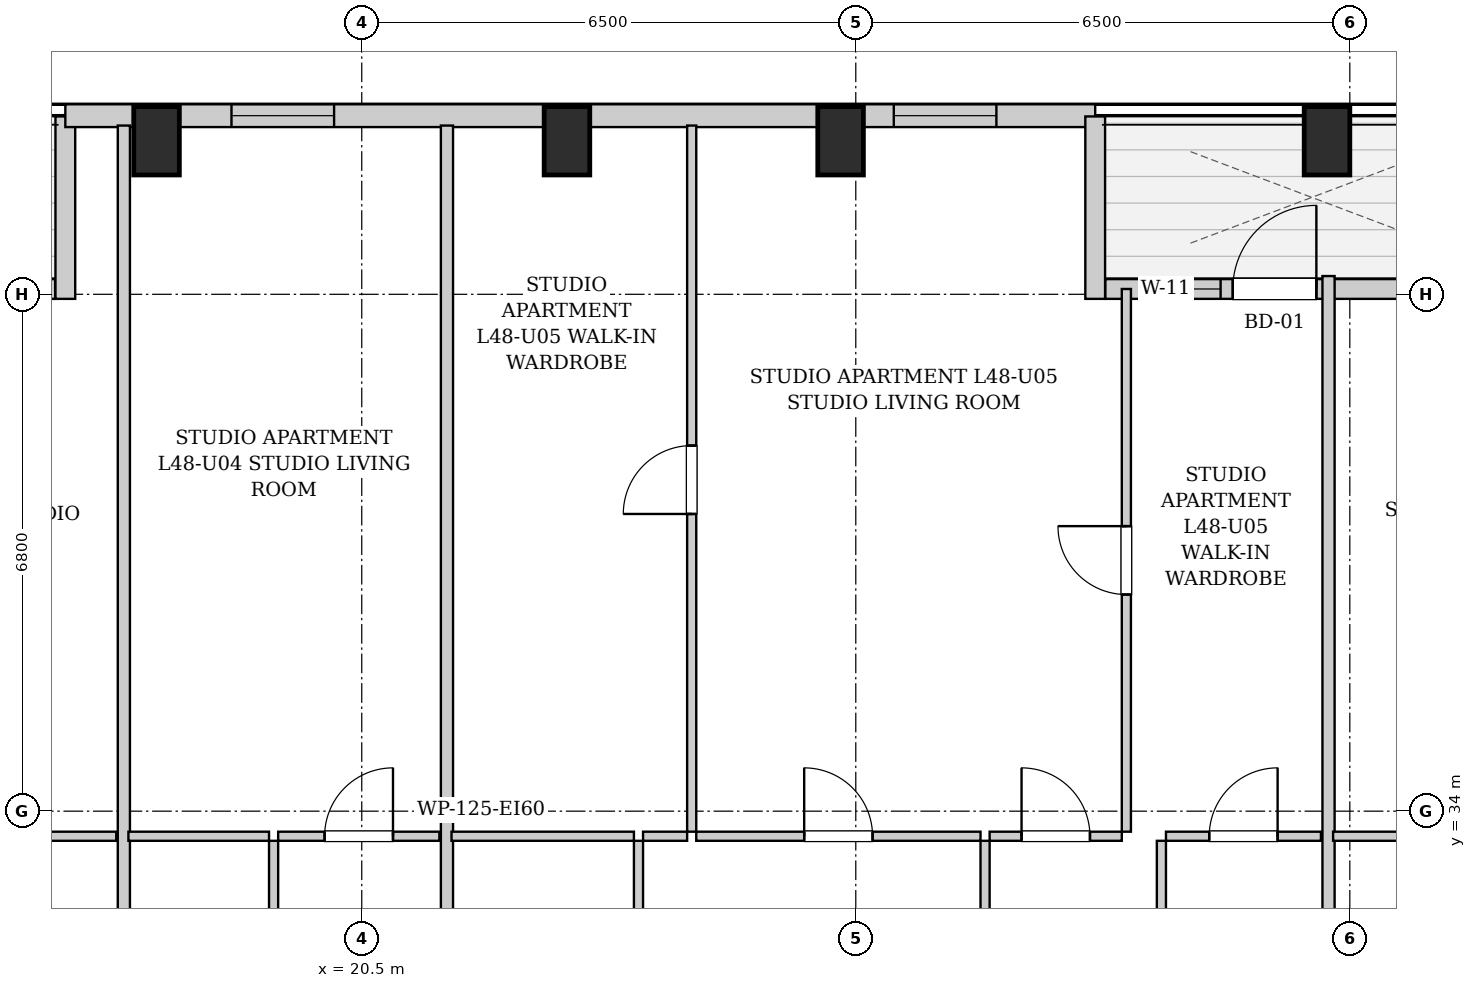
"""IFC4 building model, lengths in metres.
Left out: names, types, materials, properties, quantities, classifications, styles, units other than length and angle.
Written with IfcOpenShell. Run it as: python <this file> out.ifc"""

import sys

from ifc_helpers import new_model, si_unit, direction, frame, frame_2d, origin, origin_2d, place, context, subcontext, project, spatial, rectangle, extrude, element, fill, save


model = new_model("IFC4")
c1 = context("Model", 3, precision=1e-05, world=origin(), true_north=direction((0.0, 1.0)))
c2 = subcontext(c1, "Body", "Model", "MODEL_VIEW")
j1 = project(units=[si_unit("LENGTHUNIT", "METRE"), si_unit("PLANEANGLEUNIT", "RADIAN")], contexts=[c1])
p1 = place(None, origin())
s1 = spatial("IfcSite", under=j1, at=p1, CompositionType="ELEMENT")
p2 = place(p1, origin())
s2 = spatial("IfcBuilding", under=s1, at=p2, CompositionType="ELEMENT")
p3 = place(p2, frame((0.0, 0.0, 166.65)))
s3 = spatial("IfcBuildingStorey", under=s2, at=p3, CompositionType="ELEMENT", Elevation=166.65)
for number, where, z_axis, x_axis in (
    (1, (17.8, 42.82, 0.0), (0.0, 0.0, 1.0), (1.0, 0.0, 0.0)),
    (2, (23.2, 42.82, 0.0), (0.0, 0.0, 1.0), (1.0, 0.0, 0.0)),
    (3, (26.8, 42.82, 0.0), (0.0, 0.0, 1.0), (1.0, 0.0, 0.0)),
    (4, (33.2, 42.82, 0.0), (0.0, 0.0, 1.0), (1.0, 0.0, 0.0)),
):
    element("IfcColumn", number, at=place(p3, frame(where, z_axis=z_axis, x_axis=x_axis)), inside=s3, PredefinedType="COLUMN", context=c2, shape_type="SweptSolid", body=[
        extrude(rectangle(XDim=0.6, YDim=0.9, at=origin_2d()), origin(), (0.0, 0.0, 1.0), 3.25),
    ])
p4 = place(p3, frame((11.434, 40.87, 0.0), z_axis=(0.0, 0.0, 1.0), x_axis=(1.0, 0.0, 0.0)))
e5 = element("IfcWall", 5, at=p4, inside=s3, PredefinedType="SOLIDWALL", context=c2, shape_type="SweptSolid", body=[
    extrude(rectangle(XDim=5.032, YDim=0.26, at=frame_2d((2.516, 0.0))), origin(), (0.0, 0.0, 1.0), 2.93),
])
p5 = place(p4, frame((1.966, 0.0, 0.0)))
e6 = element("IfcOpeningElement", 6, at=p5, cuts=e5, PredefinedType="OPENING", context=c2, shape_type="SweptSolid", body=[
    extrude(rectangle(XDim=1.1, YDim=2.0, at=frame_2d((0.55, 1.0))), frame((0.0, 0.14, 0.0), z_axis=(0.0, -1.0, 0.0), x_axis=(1.0, 0.0, 0.0)), (0.0, 0.0, 1.0), 0.28),
])
p6 = place(p4, frame((3.326, 0.0, 0.85)))
e7 = element("IfcOpeningElement", 7, at=p6, cuts=e5, PredefinedType="OPENING", context=c2, shape_type="SweptSolid", body=[
    extrude(rectangle(XDim=1.35, YDim=1.65, at=frame_2d((0.675, 0.825))), frame((0.0, 0.14, 0.0), z_axis=(0.0, -1.0, 0.0), x_axis=(1.0, 0.0, 0.0)), (0.0, 0.0, 1.0), 0.28),
])
p7 = place(p3, frame((16.6, 40.74, 0.0), z_axis=(0.0, 0.0, 1.0), x_axis=(0.0, 1.0, 0.0)))
e8 = element("IfcWall", 8, at=p7, inside=s3, PredefinedType="SOLIDWALL", context=c2, shape_type="SweptSolid", body=[
    extrude(rectangle(XDim=2.4, YDim=0.26, at=frame_2d((1.2, 0.0))), origin(), (0.0, 0.0, 1.0), 2.93),
])
p8 = place(p3, frame((16.6, 43.15, 0.0), z_axis=(0.0, 0.0, 1.0), x_axis=(1.0, 0.0, 0.0)))
e9 = element("IfcWall", 9, at=p8, inside=s3, PredefinedType="SOLIDWALL", context=c2, shape_type="SweptSolid", body=[
    extrude(rectangle(XDim=13.55, YDim=0.3, at=frame_2d((6.775, 0.0))), origin(), (0.0, 0.0, 1.0), 2.93),
])
p9 = place(p8, frame((2.186, 0.0, 0.55)))
e10 = element("IfcOpeningElement", 10, at=p9, cuts=e9, PredefinedType="OPENING", context=c2, shape_type="SweptSolid", body=[
    extrude(rectangle(XDim=1.35, YDim=1.2, at=frame_2d((0.675, 0.6))), frame((0.0, 0.16, 0.0), z_axis=(0.0, -1.0, 0.0), x_axis=(1.0, 0.0, 0.0)), (0.0, 0.0, 1.0), 0.32),
])
p10 = place(p8, frame((10.9, 0.0, 0.55)))
e11 = element("IfcOpeningElement", 11, at=p10, cuts=e9, PredefinedType="OPENING", context=c2, shape_type="SweptSolid", body=[
    extrude(rectangle(XDim=1.35, YDim=1.2, at=frame_2d((0.675, 0.6))), frame((0.0, 0.16, 0.0), z_axis=(0.0, -1.0, 0.0), x_axis=(1.0, 0.0, 0.0)), (0.0, 0.0, 1.0), 0.32),
])
p11 = place(p3, frame((30.15, 43.14, 0.0), z_axis=(0.0, 0.0, 1.0), x_axis=(0.0, -1.0, 0.0)))
e12 = element("IfcWall", 12, at=p11, inside=s3, PredefinedType="SOLIDWALL", context=c2, shape_type="SweptSolid", body=[
    extrude(rectangle(XDim=2.4, YDim=0.26, at=frame_2d((1.2, 0.0))), origin(), (0.0, 0.0, 1.0), 2.93),
])
p12 = place(p3, frame((30.284, 40.87, 0.0), z_axis=(0.0, 0.0, 1.0), x_axis=(1.0, 0.0, 0.0)))
e13 = element("IfcWall", 13, at=p12, inside=s3, PredefinedType="SOLIDWALL", context=c2, shape_type="SweptSolid", body=[
    extrude(rectangle(XDim=5.432, YDim=0.26, at=frame_2d((2.716, 0.0))), origin(), (0.0, 0.0, 1.0), 2.93),
])
p13 = place(p12, frame((1.676, 0.0, 0.0)))
e14 = element("IfcOpeningElement", 14, at=p13, cuts=e13, PredefinedType="OPENING", context=c2, shape_type="SweptSolid", body=[
    extrude(rectangle(XDim=1.1, YDim=2.0, at=frame_2d((0.55, 1.0))), frame((0.0, 0.14, 0.0), z_axis=(0.0, -1.0, 0.0), x_axis=(1.0, 0.0, 0.0)), (0.0, 0.0, 1.0), 0.28),
])
p14 = place(p12, frame((0.666, 0.0, 0.55)))
e15 = element("IfcOpeningElement", 15, at=p14, cuts=e13, PredefinedType="OPENING", context=c2, shape_type="SweptSolid", body=[
    extrude(rectangle(XDim=0.85, YDim=1.2, at=frame_2d((0.425, 0.6))), frame((0.0, 0.14, 0.0), z_axis=(0.0, -1.0, 0.0), x_axis=(1.0, 0.0, 0.0)), (0.0, 0.0, 1.0), 0.28),
])
p15 = place(p3, frame((12.357, 33.67, 0.0), z_axis=(0.0, 0.0, 1.0), x_axis=(1.0, 0.0, 0.0)))
e16 = element("IfcWall", 16, at=p15, inside=s3, PredefinedType="PARTITIONING", context=c2, shape_type="SweptSolid", body=[
    extrude(rectangle(XDim=4.913, YDim=0.12, at=frame_2d((2.457, 0.0))), origin(), (0.0, 0.0, 1.0), 2.93),
])
p16 = place(p15, frame((2.006, 0.0, 0.0)))
e17 = element("IfcOpeningElement", 17, at=p16, cuts=e16, PredefinedType="OPENING", context=c2, shape_type="SweptSolid", body=[
    extrude(rectangle(XDim=0.9, YDim=2.05, at=frame_2d((0.45, 1.025))), frame((0.0, 0.07, 0.0), z_axis=(0.0, -1.0, 0.0), x_axis=(1.0, 0.0, 0.0)), (0.0, 0.0, 1.0), 0.14),
])
p17 = place(p3, frame((17.37, 30.76, 0.0), z_axis=(0.0, 0.0, 1.0), x_axis=(0.0, 1.0, 0.0)))
e18 = element("IfcWall", 18, at=p17, inside=s3, PredefinedType="PARTITIONING", context=c2, shape_type="SweptSolid", body=[
    extrude(rectangle(XDim=12.26, YDim=0.16, at=frame_2d((6.13, 0.0))), origin(), (0.0, 0.0, 1.0), 2.93),
])
p18 = place(p3, frame((19.34, 30.76, 0.0), z_axis=(0.0, 0.0, 1.0), x_axis=(0.0, 1.0, 0.0)))
e19 = element("IfcWall", 19, at=p18, inside=s3, PredefinedType="PARTITIONING", context=c2, shape_type="SweptSolid", body=[
    extrude(rectangle(XDim=2.85, YDim=0.12, at=frame_2d((1.425, 0.0))), origin(), (0.0, 0.0, 1.0), 2.93),
])
p19 = place(p18, frame((0.995, 0.0, 0.0)))
e20 = element("IfcOpeningElement", 20, at=p19, cuts=e19, PredefinedType="OPENING", context=c2, shape_type="SweptSolid", body=[
    extrude(rectangle(XDim=0.86, YDim=2.05, at=frame_2d((0.43, 1.025))), frame((0.0, 0.07, 0.0), z_axis=(0.0, -1.0, 0.0), x_axis=(1.0, 0.0, 0.0)), (0.0, 0.0, 1.0), 0.14),
])
p20 = place(p3, frame((17.43, 33.67, 0.0), z_axis=(0.0, 0.0, 1.0), x_axis=(1.0, 0.0, 0.0)))
e21 = element("IfcWall", 21, at=p20, inside=s3, PredefinedType="PARTITIONING", context=c2, shape_type="SweptSolid", body=[
    extrude(rectangle(XDim=1.85, YDim=0.12, at=frame_2d((0.925, 0.0))), origin(), (0.0, 0.0, 1.0), 2.93),
])
p21 = place(p3, frame((19.4, 33.67, 0.0), z_axis=(0.0, 0.0, 1.0), x_axis=(1.0, 0.0, 0.0)))
e22 = element("IfcWall", 22, at=p21, inside=s3, PredefinedType="PARTITIONING", context=c2, shape_type="SweptSolid", body=[
    extrude(rectangle(XDim=2.121, YDim=0.12, at=frame_2d((1.061, 0.0))), origin(), (0.0, 0.0, 1.0), 2.93),
])
p22 = place(p21, frame((0.611, 0.0, 0.0)))
e23 = element("IfcOpeningElement", 23, at=p22, cuts=e22, PredefinedType="OPENING", context=c2, shape_type="SweptSolid", body=[
    extrude(rectangle(XDim=0.9, YDim=2.05, at=frame_2d((0.45, 1.025))), frame((0.0, 0.07, 0.0), z_axis=(0.0, -1.0, 0.0), x_axis=(1.0, 0.0, 0.0)), (0.0, 0.0, 1.0), 0.14),
])
p23 = place(p3, frame((21.621, 30.76, 0.0), z_axis=(0.0, 0.0, 1.0), x_axis=(0.0, 1.0, 0.0)))
e24 = element("IfcWall", 24, at=p23, inside=s3, PredefinedType="PARTITIONING", context=c2, shape_type="SweptSolid", body=[
    extrude(rectangle(XDim=12.26, YDim=0.16, at=frame_2d((6.13, 0.0))), origin(), (0.0, 0.0, 1.0), 2.93),
])
p24 = place(p3, frame((24.141, 30.76, 0.0), z_axis=(0.0, 0.0, 1.0), x_axis=(0.0, 1.0, 0.0)))
e25 = element("IfcWall", 25, at=p24, inside=s3, PredefinedType="PARTITIONING", context=c2, shape_type="SweptSolid", body=[
    extrude(rectangle(XDim=2.85, YDim=0.12, at=frame_2d((1.425, 0.0))), origin(), (0.0, 0.0, 1.0), 2.93),
])
p25 = place(p24, frame((0.995, 0.0, 0.0)))
e26 = element("IfcOpeningElement", 26, at=p25, cuts=e25, PredefinedType="OPENING", context=c2, shape_type="SweptSolid", body=[
    extrude(rectangle(XDim=0.86, YDim=2.05, at=frame_2d((0.43, 1.025))), frame((0.0, 0.07, 0.0), z_axis=(0.0, -1.0, 0.0), x_axis=(1.0, 0.0, 0.0)), (0.0, 0.0, 1.0), 0.14),
])
p26 = place(p3, frame((21.681, 33.67, 0.0), z_axis=(0.0, 0.0, 1.0), x_axis=(1.0, 0.0, 0.0)))
e27 = element("IfcWall", 27, at=p26, inside=s3, PredefinedType="PARTITIONING", context=c2, shape_type="SweptSolid", body=[
    extrude(rectangle(XDim=2.4, YDim=0.12, at=frame_2d((1.2, 0.0))), origin(), (0.0, 0.0, 1.0), 2.93),
])
p27 = place(p3, frame((28.701, 30.76, 0.0), z_axis=(0.0, 0.0, 1.0), x_axis=(0.0, 1.0, 0.0)))
e28 = element("IfcWall", 28, at=p27, inside=s3, PredefinedType="PARTITIONING", context=c2, shape_type="SweptSolid", body=[
    extrude(rectangle(XDim=2.85, YDim=0.12, at=frame_2d((1.425, 0.0))), origin(), (0.0, 0.0, 1.0), 2.93),
])
p28 = place(p27, frame((0.975, 0.0, 0.0)))
e29 = element("IfcOpeningElement", 29, at=p28, cuts=e28, PredefinedType="OPENING", context=c2, shape_type="SweptSolid", body=[
    extrude(rectangle(XDim=0.9, YDim=2.05, at=frame_2d((0.45, 1.025))), frame((0.0, 0.07, 0.0), z_axis=(0.0, -1.0, 0.0), x_axis=(1.0, 0.0, 0.0)), (0.0, 0.0, 1.0), 0.14),
])
p29 = place(p3, frame((24.201, 33.67, 0.0), z_axis=(0.0, 0.0, 1.0), x_axis=(1.0, 0.0, 0.0)))
e30 = element("IfcWall", 30, at=p29, inside=s3, PredefinedType="PARTITIONING", context=c2, shape_type="SweptSolid", body=[
    extrude(rectangle(XDim=0.58, YDim=0.12, at=frame_2d((0.29, 0.0))), origin(), (0.0, 0.0, 1.0), 2.93),
])
p30 = place(p3, frame((24.901, 33.67, 0.0), z_axis=(0.0, 0.0, 1.0), x_axis=(1.0, 0.0, 0.0)))
e31 = element("IfcWall", 31, at=p30, inside=s3, PredefinedType="PARTITIONING", context=c2, shape_type="SweptSolid", body=[
    extrude(rectangle(XDim=3.74, YDim=0.12, at=frame_2d((1.87, 0.0))), origin(), (0.0, 0.0, 1.0), 2.93),
])
p31 = place(p30, frame((1.42, 0.0, 0.0)))
e32 = element("IfcOpeningElement", 32, at=p31, cuts=e31, PredefinedType="OPENING", context=c2, shape_type="SweptSolid", body=[
    extrude(rectangle(XDim=0.9, YDim=2.05, at=frame_2d((0.45, 1.025))), frame((0.0, 0.07, 0.0), z_axis=(0.0, -1.0, 0.0), x_axis=(1.0, 0.0, 0.0)), (0.0, 0.0, 1.0), 0.14),
])
p32 = place(p3, frame((31.021, 30.76, 0.0), z_axis=(0.0, 0.0, 1.0), x_axis=(0.0, 1.0, 0.0)))
e33 = element("IfcWall", 33, at=p32, inside=s3, PredefinedType="PARTITIONING", context=c2, shape_type="SweptSolid", body=[
    extrude(rectangle(XDim=2.85, YDim=0.12, at=frame_2d((1.425, 0.0))), origin(), (0.0, 0.0, 1.0), 2.93),
])
p33 = place(p32, frame((0.975, 0.0, 0.0)))
e34 = element("IfcOpeningElement", 34, at=p33, cuts=e33, PredefinedType="OPENING", context=c2, shape_type="SweptSolid", body=[
    extrude(rectangle(XDim=0.9, YDim=2.05, at=frame_2d((0.45, 1.025))), frame((0.0, 0.07, 0.0), z_axis=(0.0, -1.0, 0.0), x_axis=(1.0, 0.0, 0.0)), (0.0, 0.0, 1.0), 0.14),
])
p34 = place(p3, frame((28.761, 33.67, 0.0), z_axis=(0.0, 0.0, 1.0), x_axis=(1.0, 0.0, 0.0)))
e35 = element("IfcWall", 35, at=p34, inside=s3, PredefinedType="PARTITIONING", context=c2, shape_type="SweptSolid", body=[
    extrude(rectangle(XDim=1.739, YDim=0.12, at=frame_2d((0.87, 0.0))), origin(), (0.0, 0.0, 1.0), 2.93),
])
p35 = place(p34, frame((0.42, 0.0, 0.0)))
e36 = element("IfcOpeningElement", 36, at=p35, cuts=e35, PredefinedType="OPENING", context=c2, shape_type="SweptSolid", body=[
    extrude(rectangle(XDim=0.9, YDim=2.05, at=frame_2d((0.45, 1.025))), frame((0.0, 0.07, 0.0), z_axis=(0.0, -1.0, 0.0), x_axis=(1.0, 0.0, 0.0)), (0.0, 0.0, 1.0), 0.14),
])
p36 = place(p3, frame((31.081, 33.67, 0.0), z_axis=(0.0, 0.0, 1.0), x_axis=(1.0, 0.0, 0.0)))
e37 = element("IfcWall", 37, at=p36, inside=s3, PredefinedType="PARTITIONING", context=c2, shape_type="SweptSolid", body=[
    extrude(rectangle(XDim=2.039, YDim=0.12, at=frame_2d((1.02, 0.0))), origin(), (0.0, 0.0, 1.0), 2.93),
])
p37 = place(p36, frame((0.569, 0.0, 0.0)))
e38 = element("IfcOpeningElement", 38, at=p37, cuts=e37, PredefinedType="OPENING", context=c2, shape_type="SweptSolid", body=[
    extrude(rectangle(XDim=0.9, YDim=2.05, at=frame_2d((0.45, 1.025))), frame((0.0, 0.07, 0.0), z_axis=(0.0, -1.0, 0.0), x_axis=(1.0, 0.0, 0.0)), (0.0, 0.0, 1.0), 0.14),
])
p38 = place(p3, frame((24.841, 33.73, 0.0), z_axis=(0.0, 0.0, 1.0), x_axis=(0.0, 1.0, 0.0)))
e39 = element("IfcWall", 39, at=p38, inside=s3, PredefinedType="PARTITIONING", context=c2, shape_type="SweptSolid", body=[
    extrude(rectangle(XDim=9.29, YDim=0.12, at=frame_2d((4.645, 0.0))), origin(), (0.0, 0.0, 1.0), 2.93),
])
p39 = place(p38, frame((4.18, 0.0, 0.0)))
e40 = element("IfcOpeningElement", 40, at=p39, cuts=e39, PredefinedType="OPENING", context=c2, shape_type="SweptSolid", body=[
    extrude(rectangle(XDim=0.9, YDim=2.05, at=frame_2d((0.45, 1.025))), frame((0.0, 0.07, 0.0), z_axis=(0.0, -1.0, 0.0), x_axis=(1.0, 0.0, 0.0)), (0.0, 0.0, 1.0), 0.14),
])
p40 = place(p3, frame((30.56, 33.73, 0.0), z_axis=(0.0, 0.0, 1.0), x_axis=(0.0, 1.0, 0.0)))
e41 = element("IfcWall", 41, at=p40, inside=s3, PredefinedType="PARTITIONING", context=c2, shape_type="SweptSolid", body=[
    extrude(rectangle(XDim=7.14, YDim=0.12, at=frame_2d((3.57, 0.0))), origin(), (0.0, 0.0, 1.0), 2.93),
])
p41 = place(p40, frame((3.12, 0.0, 0.0)))
e42 = element("IfcOpeningElement", 42, at=p41, cuts=e41, PredefinedType="OPENING", context=c2, shape_type="SweptSolid", body=[
    extrude(rectangle(XDim=0.9, YDim=2.05, at=frame_2d((0.45, 1.025))), frame((0.0, 0.07, 0.0), z_axis=(0.0, -1.0, 0.0), x_axis=(1.0, 0.0, 0.0)), (0.0, 0.0, 1.0), 0.14),
])
p42 = place(p3, frame((33.22, 30.76, 0.0), z_axis=(0.0, 0.0, 1.0), x_axis=(0.0, 1.0, 0.0)))
e43 = element("IfcWall", 43, at=p42, inside=s3, PredefinedType="PARTITIONING", context=c2, shape_type="SweptSolid", body=[
    extrude(rectangle(XDim=10.28, YDim=0.16, at=frame_2d((5.14, 0.0))), origin(), (0.0, 0.0, 1.0), 2.382),
])
p43 = place(p3, frame((33.28, 33.67, 0.0), z_axis=(0.0, 0.0, 1.0), x_axis=(1.0, 0.0, 0.0)))
e44 = element("IfcWall", 44, at=p43, inside=s3, PredefinedType="PARTITIONING", context=c2, shape_type="SweptSolid", body=[
    extrude(rectangle(XDim=1.85, YDim=0.12, at=frame_2d((0.925, 0.0))), origin(), (0.0, 0.0, 1.0), 2.93),
])
p44 = place(p22, origin())
e45 = element("IfcDoor", 45, at=p44, inside=s3, OperationType="SINGLE_SWING_RIGHT", PredefinedType="DOOR", context=c2, shape_type="SweptSolid", body=[
    extrude(rectangle(XDim=0.9, YDim=2.05, at=frame_2d((0.45, 1.025))), frame((0.0, 0.025, 0.0), z_axis=(0.0, -1.0, 0.0), x_axis=(1.0, 0.0, 0.0)), (0.0, 0.0, 1.0), 0.05),
])
fill(e23, e45)
p45 = place(p31, origin())
e46 = element("IfcDoor", 46, at=p45, inside=s3, OperationType="SINGLE_SWING_LEFT", PredefinedType="DOOR", context=c2, shape_type="SweptSolid", body=[
    extrude(rectangle(XDim=0.9, YDim=2.05, at=frame_2d((0.45, 1.025))), frame((0.0, 0.025, 0.0), z_axis=(0.0, -1.0, 0.0), x_axis=(1.0, 0.0, 0.0)), (0.0, 0.0, 1.0), 0.05),
])
fill(e32, e46)
p46 = place(p35, origin())
e47 = element("IfcDoor", 47, at=p46, inside=s3, OperationType="SINGLE_SWING_LEFT", PredefinedType="DOOR", context=c2, shape_type="SweptSolid", body=[
    extrude(rectangle(XDim=0.9, YDim=2.05, at=frame_2d((0.45, 1.025))), frame((0.0, 0.025, 0.0), z_axis=(0.0, -1.0, 0.0), x_axis=(1.0, 0.0, 0.0)), (0.0, 0.0, 1.0), 0.05),
])
fill(e36, e47)
p47 = place(p37, origin())
e48 = element("IfcDoor", 48, at=p47, inside=s3, OperationType="SINGLE_SWING_RIGHT", PredefinedType="DOOR", context=c2, shape_type="SweptSolid", body=[
    extrude(rectangle(XDim=0.9, YDim=2.05, at=frame_2d((0.45, 1.025))), frame((0.0, 0.025, 0.0), z_axis=(0.0, -1.0, 0.0), x_axis=(1.0, 0.0, 0.0)), (0.0, 0.0, 1.0), 0.05),
])
fill(e38, e48)
p48 = place(p39, origin())
e49 = element("IfcDoor", 49, at=p48, inside=s3, OperationType="SINGLE_SWING_LEFT", PredefinedType="DOOR", context=c2, shape_type="SweptSolid", body=[
    extrude(rectangle(XDim=0.9, YDim=2.05, at=frame_2d((0.45, 1.025))), frame((0.0, 0.025, 0.0), z_axis=(0.0, -1.0, 0.0), x_axis=(1.0, 0.0, 0.0)), (0.0, 0.0, 1.0), 0.05),
])
fill(e40, e49)
p49 = place(p41, origin())
e50 = element("IfcDoor", 50, at=p49, inside=s3, OperationType="SINGLE_SWING_RIGHT", PredefinedType="DOOR", context=c2, shape_type="SweptSolid", body=[
    extrude(rectangle(XDim=0.9, YDim=2.05, at=frame_2d((0.45, 1.025))), frame((0.0, 0.025, 0.0), z_axis=(0.0, -1.0, 0.0), x_axis=(1.0, 0.0, 0.0)), (0.0, 0.0, 1.0), 0.05),
])
fill(e42, e50)
p50 = place(p13, origin())
e51 = element("IfcDoor", 51, at=p50, inside=s3, OperationType="SINGLE_SWING_RIGHT", PredefinedType="DOOR", context=c2, shape_type="SweptSolid", body=[
    extrude(rectangle(XDim=1.1, YDim=2.0, at=frame_2d((0.55, 1.0))), frame((0.0, 0.025, 0.0), z_axis=(0.0, -1.0, 0.0), x_axis=(1.0, 0.0, 0.0)), (0.0, 0.0, 1.0), 0.05),
])
fill(e14, e51)
p51 = place(p9, origin())
e52 = element("IfcWindow", 52, at=p51, inside=s3, PartitioningType="SINGLE_PANEL", PredefinedType="WINDOW", context=c2, shape_type="SweptSolid", body=[
    extrude(rectangle(XDim=1.35, YDim=1.2, at=frame_2d((0.675, 0.6))), frame((0.0, 0.03, 0.0), z_axis=(0.0, -1.0, 0.0), x_axis=(1.0, 0.0, 0.0)), (0.0, 0.0, 1.0), 0.06),
])
fill(e10, e52)
p52 = place(p10, origin())
e53 = element("IfcWindow", 53, at=p52, inside=s3, PartitioningType="SINGLE_PANEL", PredefinedType="WINDOW", context=c2, shape_type="SweptSolid", body=[
    extrude(rectangle(XDim=1.35, YDim=1.2, at=frame_2d((0.675, 0.6))), frame((0.0, 0.03, 0.0), z_axis=(0.0, -1.0, 0.0), x_axis=(1.0, 0.0, 0.0)), (0.0, 0.0, 1.0), 0.06),
])
fill(e11, e53)
p53 = place(p14, origin())
e54 = element("IfcWindow", 54, at=p53, inside=s3, PartitioningType="SINGLE_PANEL", PredefinedType="WINDOW", context=c2, shape_type="SweptSolid", body=[
    extrude(rectangle(XDim=0.85, YDim=1.2, at=frame_2d((0.425, 0.6))), frame((0.0, 0.03, 0.0), z_axis=(0.0, -1.0, 0.0), x_axis=(1.0, 0.0, 0.0)), (0.0, 0.0, 1.0), 0.06),
])
fill(e15, e54)
save(model, sys.argv[1])
